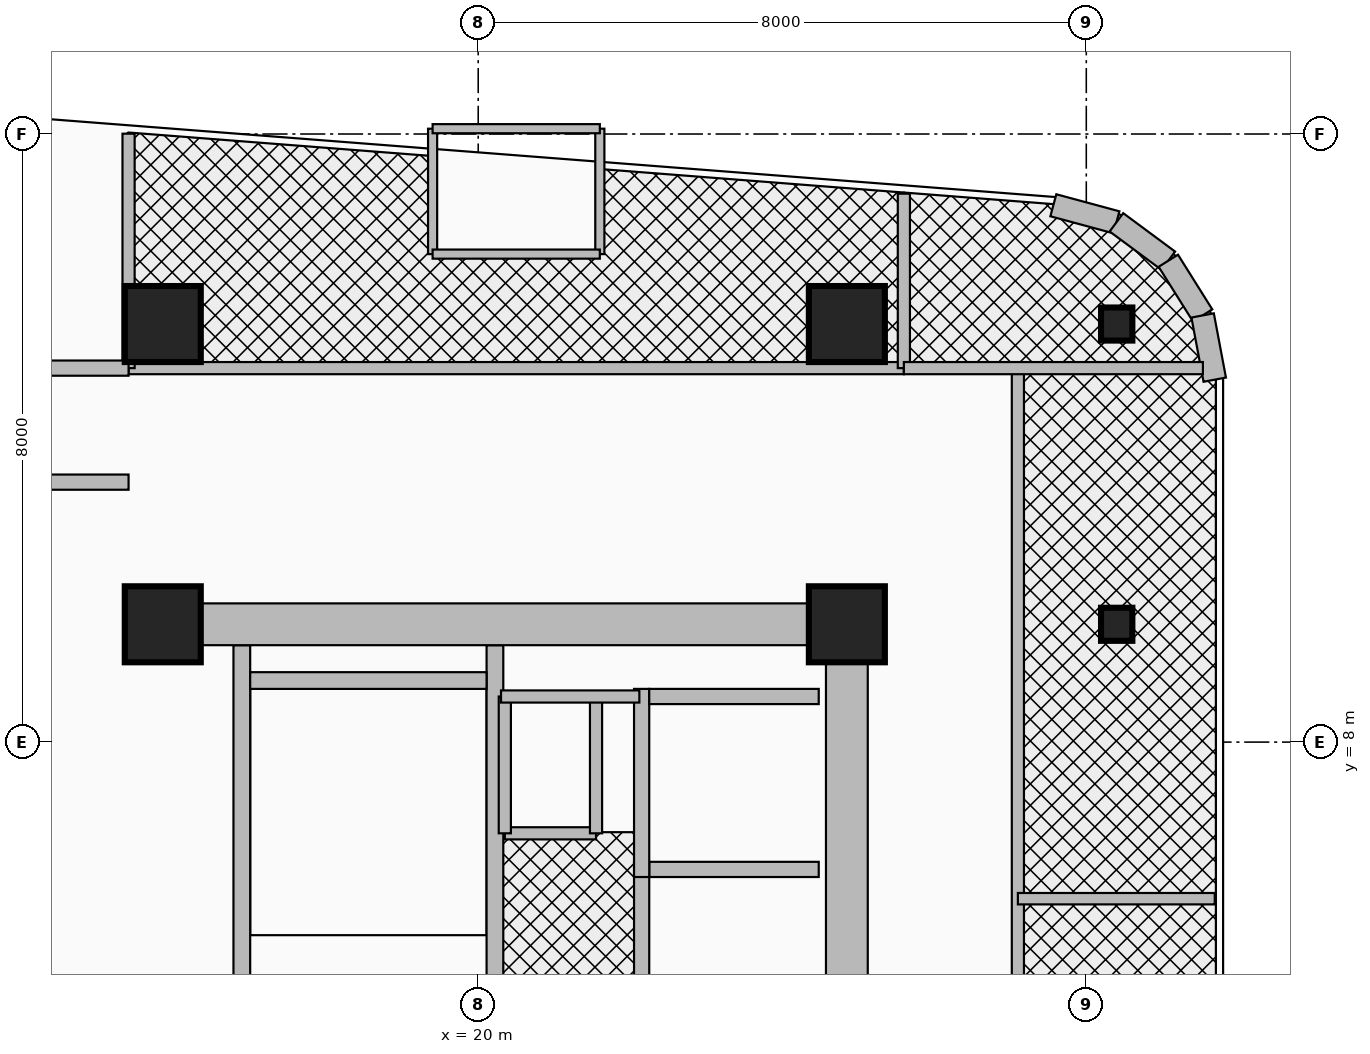
"""IFC4 building model, lengths in metres.
Left out: names, types, materials, properties, quantities, classifications, styles, units other than length and angle.
Written with IfcOpenShell. Run it as: python <this file> out.ifc"""

import sys

from ifc_helpers import new_model, si_unit, direction, frame, frame_2d, origin, origin_2d, place, context, subcontext, project, spatial, rectangle, i_section, extrude, source, transform, mapped, element, fill, save


model = new_model("IFC4")
c1 = context("Model", 3, precision=1e-05, world=origin(), true_north=direction((0.0, 1.0)))
c2 = subcontext(c1, "Body", "Model", "MODEL_VIEW")
j1 = project(units=[si_unit("LENGTHUNIT", "METRE"), si_unit("PLANEANGLEUNIT", "RADIAN")], contexts=[c1])
p1 = place(None, origin())
s1 = spatial("IfcSite", under=j1, at=p1, CompositionType="ELEMENT")
p2 = place(p1, origin())
s2 = spatial("IfcBuilding", under=s1, at=p2, CompositionType="ELEMENT")
p3 = place(p2, frame((0.0, 0.0, 172.3)))
s3 = spatial("IfcBuildingStorey", under=s2, at=p3, CompositionType="ELEMENT", Elevation=172.3)
for number, where, z_axis, x_axis in (
    (1, (16.89, 0.68, 0.0), (0.0, 0.0, 1.0), (0.0, 1.0, 0.0)),
    (2, (20.22, 0.68, 0.0), (0.0, 0.0, 1.0), (0.0, 1.0, 0.0)),
):
    element("IfcWall", number, at=place(p3, frame(where, z_axis=z_axis, x_axis=x_axis)), inside=s3, PredefinedType="SHEAR", context=c2, shape_type="SweptSolid", body=[
        extrude(rectangle(XDim=8.595, YDim=0.22, at=frame_2d((4.297, 0.0))), origin(), (0.0, 0.0, 1.0), 3.93),
    ])
p4 = place(p3, frame((17.0, 8.81, 0.0), z_axis=(0.0, 0.0, 1.0), x_axis=(1.0, 0.0, 0.0)))
e3 = element("IfcWall", 3, at=p4, inside=s3, PredefinedType="SHEAR", context=c2, shape_type="SweptSolid", body=[
    extrude(rectangle(XDim=3.11, YDim=0.22, at=frame_2d((1.555, 0.0))), origin(), (0.0, 0.0, 1.0), 3.93),
])
p5 = place(p3, frame((24.85, 0.95, 0.0), z_axis=(0.0, 0.0, 1.0), x_axis=(0.0, 1.0, 0.0)))
e4 = element("IfcWall", 4, at=p5, inside=s3, PredefinedType="SHEAR", context=c2, shape_type="SweptSolid", body=[
    extrude(rectangle(XDim=8.875, YDim=0.55, at=frame_2d((4.438, 0.0))), origin(), (0.0, 0.0, 1.0), 3.93),
])
p6 = place(p3, frame((15.85, 9.55, 0.0), z_axis=(0.0, 0.0, 1.0), x_axis=(1.0, 0.0, 0.0)))
e5 = element("IfcWall", 5, at=p6, inside=s3, PredefinedType="SHEAR", context=c2, shape_type="SweptSolid", body=[
    extrude(rectangle(XDim=9.0, YDim=0.55, at=frame_2d((4.5, 0.0))), origin(), (0.0, 0.0, 1.0), 3.93),
])
m1 = source(origin(), c2, "Body", "SweptSolid", [
    extrude(rectangle(XDim=1.0, YDim=1.0, at=origin_2d()), origin(), (0.0, 0.0, 1.0), 4.25),
])
for number, where, z_axis, x_axis in (
    (6, (15.85, 9.55, 0.0), (0.0, 0.0, 1.0), (1.0, 0.0, 0.0)),
    (7, (24.85, 9.55, 0.0), (0.0, 0.0, 1.0), (1.0, 0.0, 0.0)),
):
    element("IfcColumn", number, at=place(p3, frame(where, z_axis=z_axis, x_axis=x_axis)), inside=s3, PredefinedType="COLUMN", context=c2, shape_type="MappedRepresentation", body=[
        mapped(m1, transform((0.0, 0.0, 0.0), x_axis=(1.0, 0.0, 0.0), y_axis=(0.0, 1.0, 0.0), z_axis=(0.0, 0.0, 1.0), scale=1.0)),
    ])
m2 = source(origin(), c2, "Body", "SweptSolid", [
    extrude(i_section(OverallWidth=0.412, OverallDepth=0.435, WebThickness=0.036, FlangeThickness=0.057, at=origin_2d()), origin(), (0.0, 0.0, 1.0), 4.25),
])
p7 = place(p3, frame((28.4, 9.55, 0.0), z_axis=(0.0, 0.0, 1.0), x_axis=(1.0, 0.0, 0.0)))
e8 = element("IfcColumn", 8, at=p7, inside=s3, PredefinedType="COLUMN", context=c2, shape_type="MappedRepresentation", body=[
    mapped(m2, transform((0.0, 0.0, 0.0), x_axis=(1.0, 0.0, 0.0), y_axis=(0.0, 1.0, 0.0), z_axis=(0.0, 0.0, 1.0), scale=1.0)),
])
for number, where, z_axis, x_axis in (
    (9, (15.85, 13.5, 0.0), (0.0, 0.0, 1.0), (1.0, 0.0, 0.0)),
    (10, (24.85, 13.5, 0.0), (0.0, 0.0, 1.0), (1.0, 0.0, 0.0)),
):
    element("IfcColumn", number, at=place(p3, frame(where, z_axis=z_axis, x_axis=x_axis)), inside=s3, PredefinedType="COLUMN", context=c2, shape_type="MappedRepresentation", body=[
        mapped(m1, transform((0.0, 0.0, 0.0), x_axis=(1.0, 0.0, 0.0), y_axis=(0.0, 1.0, 0.0), z_axis=(0.0, 0.0, 1.0), scale=1.0)),
    ])
p8 = place(p3, frame((28.4, 13.5, 0.0), z_axis=(0.0, 0.0, 1.0), x_axis=(1.0, 0.0, 0.0)))
e11 = element("IfcColumn", 11, at=p8, inside=s3, PredefinedType="COLUMN", context=c2, shape_type="MappedRepresentation", body=[
    mapped(m2, transform((0.0, 0.0, 0.0), x_axis=(1.0, 0.0, 0.0), y_axis=(0.0, 1.0, 0.0), z_axis=(0.0, 0.0, 1.0), scale=1.0)),
])
p9 = place(p3, frame((27.566, 15.062, 0.0), z_axis=(0.0, 0.0, 1.0), x_axis=(0.965357594382, -0.260930479187, 0.0)))
e12 = element("IfcWall", 12, at=p9, inside=s3, PredefinedType="SOLIDWALL", context=c2, shape_type="SweptSolid", body=[
    extrude(rectangle(XDim=0.86, YDim=0.3, at=frame_2d((0.43, 0.0))), origin(), (0.0, 0.0, 1.0), 3.93),
])
p10 = place(p3, frame((28.396, 14.838, 0.0), z_axis=(0.0, 0.0, 1.0), x_axis=(0.803847397988, -0.594835574548, 0.0)))
e13 = element("IfcWall", 13, at=p10, inside=s3, PredefinedType="SOLIDWALL", context=c2, shape_type="SweptSolid", body=[
    extrude(rectangle(XDim=0.849, YDim=0.3, at=frame_2d((0.425, 0.0))), origin(), (0.0, 0.0, 1.0), 3.93),
])
p11 = place(p3, frame((29.079, 14.333, 0.0), z_axis=(0.0, 0.0, 1.0), x_axis=(0.53134147342, -0.847157741288, 0.0)))
e14 = element("IfcWall", 14, at=p11, inside=s3, PredefinedType="SOLIDWALL", context=c2, shape_type="SweptSolid", body=[
    extrude(rectangle(XDim=0.85, YDim=0.3, at=frame_2d((0.425, 0.0))), origin(), (0.0, 0.0, 1.0), 3.93),
])
p12 = place(p3, frame((29.531, 13.613, 0.0), z_axis=(0.0, 0.0, 1.0), x_axis=(0.185402686284, -0.982662629756, 0.0)))
e15 = element("IfcWall", 15, at=p12, inside=s3, PredefinedType="SOLIDWALL", context=c2, shape_type="SweptSolid", body=[
    extrude(rectangle(XDim=0.86, YDim=0.3, at=frame_2d((0.43, 0.0))), origin(), (0.0, 0.0, 1.0), 3.93),
])
p13 = place(p3, frame((22.15, 3.95, 0.0), z_axis=(0.0, 0.0, 1.0), x_axis=(0.0, 1.0, 0.0)))
e16 = element("IfcWall", 16, at=p13, inside=s3, PredefinedType="MOVABLE", context=c2, shape_type="SweptSolid", body=[
    extrude(rectangle(XDim=2.475, YDim=0.2, at=frame_2d((1.238, 0.0))), origin(), (0.0, 0.0, 1.0), 3.93),
])
p14 = place(p13, frame((0.688, 0.0, 0.0)))
e17 = element("IfcOpeningElement", 17, at=p14, cuts=e16, PredefinedType="OPENING", context=c2, shape_type="SweptSolid", body=[
    extrude(rectangle(XDim=1.1, YDim=2.1, at=frame_2d((0.55, 1.05))), frame((0.0, 0.115, 0.0), z_axis=(0.0, -1.0, 0.0), x_axis=(1.0, 0.0, 0.0)), (0.0, 0.0, 1.0), 0.23),
])
p15 = place(p3, frame((22.25, 6.325, 0.0), z_axis=(0.0, 0.0, 1.0), x_axis=(1.0, 0.0, 0.0)))
e18 = element("IfcWall", 18, at=p15, inside=s3, PredefinedType="MOVABLE", context=c2, shape_type="SweptSolid", body=[
    extrude(rectangle(XDim=2.23, YDim=0.2, at=frame_2d((1.115, 0.0))), origin(), (0.0, 0.0, 1.0), 3.93),
])
p16 = place(p3, frame((22.15, 6.225, 0.0), z_axis=(0.0, 0.0, 1.0), x_axis=(0.0, 1.0, 0.0)))
e19 = element("IfcWall", 19, at=p16, inside=s3, PredefinedType="MOVABLE", context=c2, shape_type="SweptSolid", body=[
    extrude(rectangle(XDim=2.475, YDim=0.2, at=frame_2d((1.237, 0.0))), origin(), (0.0, 0.0, 1.0), 3.93),
])
p17 = place(p16, frame((0.688, 0.0, 0.0)))
e20 = element("IfcOpeningElement", 20, at=p17, cuts=e19, PredefinedType="OPENING", context=c2, shape_type="SweptSolid", body=[
    extrude(rectangle(XDim=1.1, YDim=2.1, at=frame_2d((0.55, 1.05))), frame((0.0, 0.115, 0.0), z_axis=(0.0, -1.0, 0.0), x_axis=(1.0, 0.0, 0.0)), (0.0, 0.0, 1.0), 0.23),
])
p18 = place(p3, frame((22.25, 8.6, 0.0), z_axis=(0.0, 0.0, 1.0), x_axis=(1.0, 0.0, 0.0)))
e21 = element("IfcWall", 21, at=p18, inside=s3, PredefinedType="MOVABLE", context=c2, shape_type="SweptSolid", body=[
    extrude(rectangle(XDim=2.23, YDim=0.2, at=frame_2d((1.115, 0.0))), origin(), (0.0, 0.0, 1.0), 3.93),
])
p19 = place(p3, frame((20.35, 6.8, 0.0), z_axis=(0.0, 0.0, 1.0), x_axis=(1.0, 0.0, 0.0)))
e22 = element("IfcWall", 22, at=p19, inside=s3, PredefinedType="PARTITIONING", context=c2, shape_type="SweptSolid", body=[
    extrude(rectangle(XDim=1.2, YDim=0.16, at=frame_2d((0.6, 0.0))), origin(), (0.0, 0.0, 1.0), 3.93),
])
p20 = place(p19, frame((0.175, 0.0, 0.0)))
e23 = element("IfcOpeningElement", 23, at=p20, cuts=e22, PredefinedType="OPENING", context=c2, shape_type="SweptSolid", body=[
    extrude(rectangle(XDim=0.85, YDim=2.05, at=frame_2d((0.425, 1.025))), frame((0.0, 0.095, 0.0), z_axis=(0.0, -1.0, 0.0), x_axis=(1.0, 0.0, 0.0)), (0.0, 0.0, 1.0), 0.19),
])
for number, where, z_axis, x_axis in (
    (24, (21.55, 6.8, 0.0), (0.0, 0.0, 1.0), (0.0, 1.0, 0.0)),
    (25, (20.35, 6.8, 0.0), (0.0, 0.0, 1.0), (0.0, 1.0, 0.0)),
):
    element("IfcWall", number, at=place(p3, frame(where, z_axis=z_axis, x_axis=x_axis)), inside=s3, PredefinedType="PARTITIONING", context=c2, shape_type="SweptSolid", body=[
        extrude(rectangle(XDim=1.8, YDim=0.16, at=frame_2d((0.9, 0.0))), origin(), (0.0, 0.0, 1.0), 3.93),
    ])
p21 = place(p3, frame((20.3, 8.6, 0.0), z_axis=(0.0, 0.0, 1.0), x_axis=(1.0, 0.0, 0.0)))
e26 = element("IfcWall", 26, at=p21, inside=s3, PredefinedType="PARTITIONING", context=c2, shape_type="SweptSolid", body=[
    extrude(rectangle(XDim=1.82, YDim=0.16, at=frame_2d((0.91, 0.0))), origin(), (0.0, 0.0, 1.0), 3.93),
])
p22 = place(p3, frame((15.4, 12.92, 0.0), z_axis=(0.0, 0.0, 1.0), x_axis=(1.0, 0.0, 0.0)))
e27 = element("IfcWall", 27, at=p22, inside=s3, PredefinedType="PARTITIONING", context=c2, shape_type="SweptSolid", body=[
    extrude(rectangle(XDim=10.2, YDim=0.16, at=frame_2d((5.1, 0.0))), origin(), (0.0, 0.0, 1.0), 2.715),
])
p23 = place(p22, frame((4.625, 0.0, 0.0)))
e28 = element("IfcOpeningElement", 28, at=p23, cuts=e27, PredefinedType="OPENING", context=c2, shape_type="SweptSolid", body=[
    extrude(rectangle(XDim=0.95, YDim=2.15, at=frame_2d((0.475, 1.075))), frame((0.0, 0.095, 0.0), z_axis=(0.0, -1.0, 0.0), x_axis=(1.0, 0.0, 0.0)), (0.0, 0.0, 1.0), 0.19),
])
p24 = place(p3, frame((15.4, 12.92, 0.0), z_axis=(0.0, 0.0, 1.0), x_axis=(0.0, 1.0, 0.0)))
e29 = element("IfcWall", 29, at=p24, inside=s3, PredefinedType="PARTITIONING", context=c2, shape_type="SweptSolid", body=[
    extrude(rectangle(XDim=3.084, YDim=0.16, at=frame_2d((1.542, 0.0))), origin(), (0.0, 0.0, 1.0), 2.715),
])
p25 = place(p3, frame((25.6, 12.92, 0.0), z_axis=(0.0, 0.0, 1.0), x_axis=(0.0, 1.0, 0.0)))
e30 = element("IfcWall", 30, at=p25, inside=s3, PredefinedType="PARTITIONING", context=c2, shape_type="SweptSolid", body=[
    extrude(rectangle(XDim=2.295, YDim=0.16, at=frame_2d((1.147, 0.0))), origin(), (0.0, 0.0, 1.0), 2.965),
])
for number, where, z_axis, x_axis in (
    (31, (19.4, 14.42, 0.0), (0.0, 0.0, 1.0), (0.0, 1.0, 0.0)),
    (32, (21.6, 14.42, 0.0), (0.0, 0.0, 1.0), (0.0, 1.0, 0.0)),
):
    element("IfcWall", number, at=place(p3, frame(where, z_axis=z_axis, x_axis=x_axis)), inside=s3, PredefinedType="PARTITIONING", context=c2, shape_type="SweptSolid", body=[
        extrude(rectangle(XDim=1.65, YDim=0.12, at=frame_2d((0.825, 0.0))), origin(), (0.0, 0.0, 1.0), 3.93),
    ])
p26 = place(p3, frame((19.4, 16.07, 0.0), z_axis=(0.0, 0.0, 1.0), x_axis=(1.0, 0.0, 0.0)))
e33 = element("IfcWall", 33, at=p26, inside=s3, PredefinedType="PARTITIONING", context=c2, shape_type="SweptSolid", body=[
    extrude(rectangle(XDim=2.2, YDim=0.12, at=frame_2d((1.1, 0.0))), origin(), (0.0, 0.0, 1.0), 3.93),
])
p27 = place(p3, frame((19.4, 14.42, 0.0), z_axis=(0.0, 0.0, 1.0), x_axis=(1.0, 0.0, 0.0)))
e34 = element("IfcWall", 34, at=p27, inside=s3, PredefinedType="PARTITIONING", context=c2, shape_type="SweptSolid", body=[
    extrude(rectangle(XDim=2.2, YDim=0.12, at=frame_2d((1.1, 0.0))), origin(), (0.0, 0.0, 1.0), 3.93),
])
p28 = place(p27, frame((0.675, 0.0, 0.0)))
e35 = element("IfcOpeningElement", 35, at=p28, cuts=e34, PredefinedType="OPENING", context=c2, shape_type="SweptSolid", body=[
    extrude(rectangle(XDim=0.85, YDim=2.1, at=frame_2d((0.425, 1.05))), frame((0.0, 0.075, 0.0), z_axis=(0.0, -1.0, 0.0), x_axis=(1.0, 0.0, 0.0)), (0.0, 0.0, 1.0), 0.15),
])
p29 = place(p3, frame((27.1, -11.89, 0.0), z_axis=(0.0, 0.0, 1.0), x_axis=(0.0, 1.0, 0.0)))
e36 = element("IfcWall", 36, at=p29, inside=s3, PredefinedType="PARTITIONING", context=c2, shape_type="SweptSolid", body=[
    extrude(rectangle(XDim=24.81, YDim=0.16, at=frame_2d((12.405, 0.0))), origin(), (0.0, 0.0, 1.0), 2.965),
])
p30 = place(p29, frame((1.12, 0.0, 0.0)))
e37 = element("IfcOpeningElement", 37, at=p30, cuts=e36, PredefinedType="OPENING", context=c2, shape_type="SweptSolid", body=[
    extrude(rectangle(XDim=0.9, YDim=2.1, at=frame_2d((0.45, 1.05))), frame((0.0, 0.095, 0.0), z_axis=(0.0, -1.0, 0.0), x_axis=(1.0, 0.0, 0.0)), (0.0, 0.0, 1.0), 0.19),
])
p31 = place(p29, frame((6.46, 0.0, 0.0)))
e38 = element("IfcOpeningElement", 38, at=p31, cuts=e36, PredefinedType="OPENING", context=c2, shape_type="SweptSolid", body=[
    extrude(rectangle(XDim=1.8, YDim=2.15, at=frame_2d((0.9, 1.075))), frame((0.0, 0.095, 0.0), z_axis=(0.0, -1.0, 0.0), x_axis=(1.0, 0.0, 0.0)), (0.0, 0.0, 1.0), 0.19),
])
p32 = place(p29, frame((13.44, 0.0, 0.0)))
e39 = element("IfcOpeningElement", 39, at=p32, cuts=e36, PredefinedType="OPENING", context=c2, shape_type="SweptSolid", body=[
    extrude(rectangle(XDim=1.8, YDim=2.15, at=frame_2d((0.9, 1.075))), frame((0.0, 0.095, 0.0), z_axis=(0.0, -1.0, 0.0), x_axis=(1.0, 0.0, 0.0)), (0.0, 0.0, 1.0), 0.19),
])
p33 = place(p29, frame((19.27, 0.0, 0.0)))
e40 = element("IfcOpeningElement", 40, at=p33, cuts=e36, PredefinedType="OPENING", context=c2, shape_type="SweptSolid", body=[
    extrude(rectangle(XDim=1.8, YDim=2.15, at=frame_2d((0.9, 1.075))), frame((0.0, 0.095, 0.0), z_axis=(0.0, -1.0, 0.0), x_axis=(1.0, 0.0, 0.0)), (0.0, 0.0, 1.0), 0.19),
])
p34 = place(p3, frame((25.6, 12.92, 0.0), z_axis=(0.0, 0.0, 1.0), x_axis=(1.0, 0.0, 0.0)))
e41 = element("IfcWall", 41, at=p34, inside=s3, PredefinedType="PARTITIONING", context=c2, shape_type="SweptSolid", body=[
    extrude(rectangle(XDim=3.934, YDim=0.16, at=frame_2d((1.967, 0.0))), origin(), (0.0, 0.0, 1.0), 3.376),
])
p35 = place(p34, frame((0.3, 0.0, 0.0)))
e42 = element("IfcOpeningElement", 42, at=p35, cuts=e41, PredefinedType="OPENING", context=c2, shape_type="SweptSolid", body=[
    extrude(rectangle(XDim=0.9, YDim=2.1, at=frame_2d((0.45, 1.05))), frame((0.0, 0.095, 0.0), z_axis=(0.0, -1.0, 0.0), x_axis=(1.0, 0.0, 0.0)), (0.0, 0.0, 1.0), 0.19),
])
p36 = place(p3, frame((27.1, 5.94, 0.0), z_axis=(0.0, 0.0, 1.0), x_axis=(1.0, 0.0, 0.0)))
e43 = element("IfcWall", 43, at=p36, inside=s3, PredefinedType="PARTITIONING", context=c2, shape_type="SweptSolid", body=[
    extrude(rectangle(XDim=2.59, YDim=0.15, at=frame_2d((1.295, 0.0))), origin(), (0.0, 0.0, 1.0), 3.376),
])
p37 = place(p3, frame((13.42, 12.92, 0.0), z_axis=(0.0, 0.0, 1.0), x_axis=(1.0, 0.0, 0.0)))
e44 = element("IfcWall", 44, at=p37, inside=s3, PredefinedType="PARTITIONING", context=c2, shape_type="SweptSolid", body=[
    extrude(rectangle(XDim=1.98, YDim=0.2, at=frame_2d((0.99, 0.0))), origin(), (0.0, 0.0, 1.0), 2.715),
])
p38 = place(p3, frame((13.42, 11.42, 0.0), z_axis=(0.0, 0.0, 1.0), x_axis=(1.0, 0.0, 0.0)))
e45 = element("IfcWall", 45, at=p38, inside=s3, PredefinedType="PARTITIONING", context=c2, shape_type="SweptSolid", body=[
    extrude(rectangle(XDim=1.98, YDim=0.2, at=frame_2d((0.99, 0.0))), origin(), (0.0, 0.0, 1.0), 3.304),
])
p39 = place(p14, origin())
e46 = element("IfcDoor", 46, at=p39, inside=s3, OperationType="DOUBLE_DOOR_SLIDING", PredefinedType="DOOR", context=c2, shape_type="SweptSolid", body=[
    extrude(rectangle(XDim=1.1, YDim=2.1, at=frame_2d((0.55, 1.05))), frame((0.0, 0.025, 0.0), z_axis=(0.0, -1.0, 0.0), x_axis=(1.0, 0.0, 0.0)), (0.0, 0.0, 1.0), 0.05),
])
fill(e17, e46)
p40 = place(p17, origin())
e47 = element("IfcDoor", 47, at=p40, inside=s3, OperationType="DOUBLE_DOOR_SLIDING", PredefinedType="DOOR", context=c2, shape_type="SweptSolid", body=[
    extrude(rectangle(XDim=1.1, YDim=2.1, at=frame_2d((0.55, 1.05))), frame((0.0, 0.025, 0.0), z_axis=(0.0, -1.0, 0.0), x_axis=(1.0, 0.0, 0.0)), (0.0, 0.0, 1.0), 0.05),
])
fill(e20, e47)
p41 = place(p20, origin())
e48 = element("IfcDoor", 48, at=p41, inside=s3, OperationType="SINGLE_SWING_RIGHT", PredefinedType="DOOR", context=c2, shape_type="SweptSolid", body=[
    extrude(rectangle(XDim=0.85, YDim=2.05, at=frame_2d((0.425, 1.025))), frame((0.0, 0.025, 0.0), z_axis=(0.0, -1.0, 0.0), x_axis=(1.0, 0.0, 0.0)), (0.0, 0.0, 1.0), 0.05),
])
fill(e23, e48)
p42 = place(p23, frame((0.95, 0.0, 0.0), z_axis=(0.0, 0.0, 1.0), x_axis=(-1.0, 0.0, 0.0)))
e49 = element("IfcDoor", 49, at=p42, inside=s3, OperationType="SINGLE_SWING_LEFT", PredefinedType="DOOR", context=c2, shape_type="SweptSolid", body=[
    extrude(rectangle(XDim=0.95, YDim=2.15, at=frame_2d((0.475, 1.075))), frame((0.0, 0.025, 0.0), z_axis=(0.0, -1.0, 0.0), x_axis=(1.0, 0.0, 0.0)), (0.0, 0.0, 1.0), 0.05),
])
fill(e28, e49)
p43 = place(p28, origin())
e50 = element("IfcDoor", 50, at=p43, inside=s3, OperationType="SINGLE_SWING_RIGHT", PredefinedType="DOOR", context=c2, shape_type="SweptSolid", body=[
    extrude(rectangle(XDim=0.85, YDim=2.1, at=frame_2d((0.425, 1.05))), frame((0.0, 0.025, 0.0), z_axis=(0.0, -1.0, 0.0), x_axis=(1.0, 0.0, 0.0)), (0.0, 0.0, 1.0), 0.05),
])
fill(e35, e50)
p44 = place(p35, origin())
e51 = element("IfcDoor", 51, at=p44, inside=s3, OperationType="SINGLE_SWING_RIGHT", PredefinedType="DOOR", context=c2, shape_type="SweptSolid", body=[
    extrude(rectangle(XDim=0.9, YDim=2.1, at=frame_2d((0.45, 1.05))), frame((0.0, 0.025, 0.0), z_axis=(0.0, -1.0, 0.0), x_axis=(1.0, 0.0, 0.0)), (0.0, 0.0, 1.0), 0.05),
])
fill(e42, e51)
p45 = place(p33, origin())
e52 = element("IfcDoor", 52, at=p45, inside=s3, OperationType="DOUBLE_DOOR_SINGLE_SWING", PredefinedType="DOOR", context=c2, shape_type="SweptSolid", body=[
    extrude(rectangle(XDim=1.8, YDim=2.15, at=frame_2d((0.9, 1.075))), frame((0.0, 0.025, 0.0), z_axis=(0.0, -1.0, 0.0), x_axis=(1.0, 0.0, 0.0)), (0.0, 0.0, 1.0), 0.05),
])
fill(e40, e52)
save(model, sys.argv[1])
